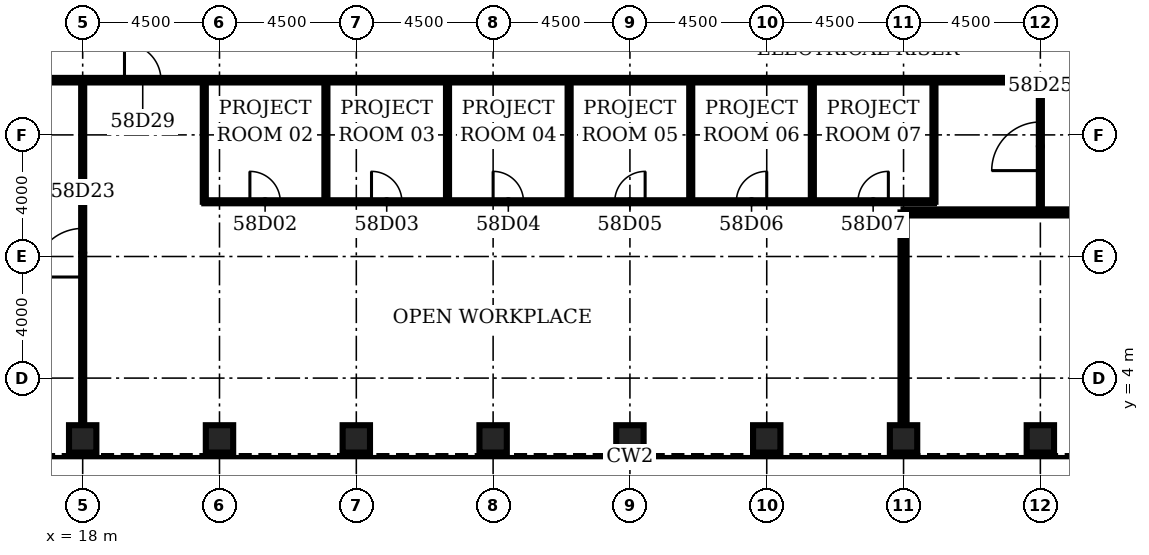
"""IFC4 building model, lengths in metres.
Left out: names, types, materials, properties, quantities, classifications, styles, units other than length and angle.
Written with IfcOpenShell. Run it as: python <this file> out.ifc"""

import sys

from ifc_helpers import new_model, si_unit, direction, frame, frame_2d, origin, origin_2d, place, context, subcontext, project, spatial, rectangle, hollow_rectangle, extrude, element, fill, save


model = new_model("IFC4")
c1 = context("Model", 3, precision=1e-05, world=origin(), true_north=direction((0.0, 1.0)))
c2 = subcontext(c1, "Body", "Model", "MODEL_VIEW")
j1 = project(units=[si_unit("LENGTHUNIT", "METRE"), si_unit("PLANEANGLEUNIT", "RADIAN")], contexts=[c1])
p1 = place(None, origin())
s1 = spatial("IfcSite", under=j1, at=p1, CompositionType="ELEMENT")
p2 = place(p1, origin())
s2 = spatial("IfcBuilding", under=s1, at=p2, CompositionType="ELEMENT")
p3 = place(p2, frame((0.0, 0.0, 257.2)))
s3 = spatial("IfcBuildingStorey", under=s2, at=p3, CompositionType="ELEMENT", Elevation=257.2)
for number, where, z_axis, x_axis in (
    (1, (18.0, 2.0, 0.0), (0.0, 0.0, 1.0), (0.0, 1.0, 0.0)),
    (2, (22.5, 2.0, 0.0), (0.0, 0.0, 1.0), (0.0, 1.0, 0.0)),
    (3, (27.0, 2.0, 0.0), (0.0, 0.0, 1.0), (0.0, 1.0, 0.0)),
    (4, (31.5, 2.0, 0.0), (0.0, 0.0, 1.0), (0.0, 1.0, 0.0)),
    (5, (36.0, 2.0, 0.0), (0.0, 0.0, 1.0), (0.0, 1.0, 0.0)),
    (6, (40.5, 2.0, 0.0), (0.0, 0.0, 1.0), (0.0, 1.0, 0.0)),
    (7, (45.0, 2.0, 0.0), (0.0, 0.0, 1.0), (0.0, 1.0, 0.0)),
    (8, (49.5, 2.0, 0.0), (0.0, 0.0, 1.0), (0.0, 1.0, 0.0)),
):
    element("IfcColumn", number, at=place(p3, frame(where, z_axis=z_axis, x_axis=x_axis)), inside=s3, PredefinedType="COLUMN", context=c2, shape_type="SweptSolid", body=[
        extrude(hollow_rectangle(XDim=0.9, YDim=0.9, WallThickness=0.07, at=origin_2d()), origin(), (0.0, 0.0, 1.0), 4.2),
    ])
p4 = place(p3, frame((45.0, 9.45, 0.0), z_axis=(0.0, 0.0, 1.0), x_axis=(1.0, 0.0, 0.0)))
e9 = element("IfcWall", 9, at=p4, inside=s3, PredefinedType="PARTITIONING", context=c2, shape_type="SweptSolid", body=[
    extrude(rectangle(XDim=18.0, YDim=0.2, at=frame_2d((9.0, 0.0))), origin(), (0.0, 0.0, 1.0), 3.0),
])
p5 = place(p4, frame((8.2, 0.0, 0.0)))
e10 = element("IfcOpeningElement", 10, at=p5, cuts=e9, PredefinedType="OPENING", context=c2, shape_type="SweptSolid", body=[
    extrude(rectangle(XDim=1.6, YDim=2.1, at=frame_2d((0.8, 1.05))), frame((0.0, 0.11, 0.0), z_axis=(0.0, -1.0, 0.0), x_axis=(1.0, 0.0, 0.0)), (0.0, 0.0, 1.0), 0.22),
])
p6 = place(p3, frame((22.0, 9.8, 0.0), z_axis=(0.0, 0.0, 1.0), x_axis=(1.0, 0.0, 0.0)))
e11 = element("IfcWall", 11, at=p6, inside=s3, PredefinedType="PARTITIONING", context=c2, shape_type="SweptSolid", body=[
    extrude(rectangle(XDim=24.0, YDim=0.1, at=frame_2d((12.0, 0.0))), origin(), (0.0, 0.0, 1.0), 3.0),
])
p7 = place(p6, frame((1.5, 0.0, 0.0)))
e12 = element("IfcOpeningElement", 12, at=p7, cuts=e11, PredefinedType="OPENING", context=c2, shape_type="SweptSolid", body=[
    extrude(rectangle(XDim=1.0, YDim=2.1, at=frame_2d((0.5, 1.05))), frame((0.0, 0.06, 0.0), z_axis=(0.0, -1.0, 0.0), x_axis=(1.0, 0.0, 0.0)), (0.0, 0.0, 1.0), 0.12),
])
p8 = place(p6, frame((5.5, 0.0, 0.0)))
e13 = element("IfcOpeningElement", 13, at=p8, cuts=e11, PredefinedType="OPENING", context=c2, shape_type="SweptSolid", body=[
    extrude(rectangle(XDim=1.0, YDim=2.1, at=frame_2d((0.5, 1.05))), frame((0.0, 0.06, 0.0), z_axis=(0.0, -1.0, 0.0), x_axis=(1.0, 0.0, 0.0)), (0.0, 0.0, 1.0), 0.12),
])
p9 = place(p6, frame((9.5, 0.0, 0.0)))
e14 = element("IfcOpeningElement", 14, at=p9, cuts=e11, PredefinedType="OPENING", context=c2, shape_type="SweptSolid", body=[
    extrude(rectangle(XDim=1.0, YDim=2.1, at=frame_2d((0.5, 1.05))), frame((0.0, 0.06, 0.0), z_axis=(0.0, -1.0, 0.0), x_axis=(1.0, 0.0, 0.0)), (0.0, 0.0, 1.0), 0.12),
])
p10 = place(p6, frame((13.5, 0.0, 0.0)))
e15 = element("IfcOpeningElement", 15, at=p10, cuts=e11, PredefinedType="OPENING", context=c2, shape_type="SweptSolid", body=[
    extrude(rectangle(XDim=1.0, YDim=2.1, at=frame_2d((0.5, 1.05))), frame((0.0, 0.06, 0.0), z_axis=(0.0, -1.0, 0.0), x_axis=(1.0, 0.0, 0.0)), (0.0, 0.0, 1.0), 0.12),
])
p11 = place(p6, frame((17.5, 0.0, 0.0)))
e16 = element("IfcOpeningElement", 16, at=p11, cuts=e11, PredefinedType="OPENING", context=c2, shape_type="SweptSolid", body=[
    extrude(rectangle(XDim=1.0, YDim=2.1, at=frame_2d((0.5, 1.05))), frame((0.0, 0.06, 0.0), z_axis=(0.0, -1.0, 0.0), x_axis=(1.0, 0.0, 0.0)), (0.0, 0.0, 1.0), 0.12),
])
p12 = place(p6, frame((21.5, 0.0, 0.0)))
e17 = element("IfcOpeningElement", 17, at=p12, cuts=e11, PredefinedType="OPENING", context=c2, shape_type="SweptSolid", body=[
    extrude(rectangle(XDim=1.0, YDim=2.1, at=frame_2d((0.5, 1.05))), frame((0.0, 0.06, 0.0), z_axis=(0.0, -1.0, 0.0), x_axis=(1.0, 0.0, 0.0)), (0.0, 0.0, 1.0), 0.12),
])
p13 = place(p3, frame((15.2, 13.8, 0.0), z_axis=(0.0, 0.0, 1.0), x_axis=(1.0, 0.0, 0.0)))
e18 = element("IfcWall", 18, at=p13, inside=s3, PredefinedType="PARTITIONING", context=c2, shape_type="SweptSolid", body=[
    extrude(rectangle(XDim=41.6, YDim=0.15, at=frame_2d((20.8, 0.0))), origin(), (0.0, 0.0, 1.0), 3.0),
])
p14 = place(p13, frame((4.175, 0.0, 0.0)))
e19 = element("IfcOpeningElement", 19, at=p14, cuts=e18, PredefinedType="OPENING", context=c2, shape_type="SweptSolid", body=[
    extrude(rectangle(XDim=1.2, YDim=2.1, at=frame_2d((0.6, 1.05))), frame((0.0, 0.085, 0.0), z_axis=(0.0, -1.0, 0.0), x_axis=(1.0, 0.0, 0.0)), (0.0, 0.0, 1.0), 0.17),
])
p15 = place(p3, frame((18.0, 2.45, 0.0), z_axis=(0.0, 0.0, 1.0), x_axis=(0.0, 1.0, 0.0)))
e20 = element("IfcWall", 20, at=p15, inside=s3, PredefinedType="PARTITIONING", context=c2, shape_type="SweptSolid", body=[
    extrude(rectangle(XDim=11.35, YDim=0.1, at=frame_2d((5.675, 0.0))), origin(), (0.0, 0.0, 1.0), 3.0),
])
p16 = place(p15, frame((4.875, 0.0, 0.0)))
e21 = element("IfcOpeningElement", 21, at=p16, cuts=e20, PredefinedType="OPENING", context=c2, shape_type="SweptSolid", body=[
    extrude(rectangle(XDim=1.6, YDim=2.1, at=frame_2d((0.8, 1.05))), frame((0.0, 0.06, 0.0), z_axis=(0.0, -1.0, 0.0), x_axis=(1.0, 0.0, 0.0)), (0.0, 0.0, 1.0), 0.12),
])
for number, where, z_axis, x_axis in (
    (22, (22.0, 9.8, 0.0), (0.0, 0.0, 1.0), (0.0, 1.0, 0.0)),
    (23, (26.0, 9.8, 0.0), (0.0, 0.0, 1.0), (0.0, 1.0, 0.0)),
    (24, (30.0, 9.8, 0.0), (0.0, 0.0, 1.0), (0.0, 1.0, 0.0)),
    (25, (34.0, 9.8, 0.0), (0.0, 0.0, 1.0), (0.0, 1.0, 0.0)),
    (26, (38.0, 9.8, 0.0), (0.0, 0.0, 1.0), (0.0, 1.0, 0.0)),
    (27, (42.0, 9.8, 0.0), (0.0, 0.0, 1.0), (0.0, 1.0, 0.0)),
):
    element("IfcWall", number, at=place(p3, frame(where, z_axis=z_axis, x_axis=x_axis)), inside=s3, PredefinedType="PARTITIONING", context=c2, shape_type="SweptSolid", body=[
        extrude(rectangle(XDim=4.0, YDim=0.1, at=frame_2d((2.0, 0.0))), origin(), (0.0, 0.0, 1.0), 3.0),
    ])
p17 = place(p3, frame((45.0, 2.45, 0.0), z_axis=(0.0, 0.0, 1.0), x_axis=(0.0, 1.0, 0.0)))
e28 = element("IfcWall", 28, at=p17, inside=s3, PredefinedType="PARTITIONING", context=c2, shape_type="SweptSolid", body=[
    extrude(rectangle(XDim=7.0, YDim=0.2, at=frame_2d((3.5, 0.0))), origin(), (0.0, 0.0, 1.0), 3.0),
])
p18 = place(p3, frame((46.0, 9.8, 0.0), z_axis=(0.0, 0.0, 1.0), x_axis=(0.0, 1.0, 0.0)))
e29 = element("IfcWall", 29, at=p18, inside=s3, PredefinedType="PARTITIONING", context=c2, shape_type="SweptSolid", body=[
    extrude(rectangle(XDim=4.0, YDim=0.1, at=frame_2d((2.0, 0.0))), origin(), (0.0, 0.0, 1.0), 3.0),
])
p19 = place(p3, frame((49.5, 9.45, 0.0), z_axis=(0.0, 0.0, 1.0), x_axis=(0.0, 1.0, 0.0)))
e30 = element("IfcWall", 30, at=p19, inside=s3, PredefinedType="PARTITIONING", context=c2, shape_type="SweptSolid", body=[
    extrude(rectangle(XDim=4.35, YDim=0.1, at=frame_2d((2.175, 0.0))), origin(), (0.0, 0.0, 1.0), 3.0),
])
p20 = place(p19, frame((1.375, 0.0, 0.0)))
e31 = element("IfcOpeningElement", 31, at=p20, cuts=e30, PredefinedType="OPENING", context=c2, shape_type="SweptSolid", body=[
    extrude(rectangle(XDim=1.6, YDim=2.1, at=frame_2d((0.8, 1.05))), frame((0.0, 0.06, 0.0), z_axis=(0.0, -1.0, 0.0), x_axis=(1.0, 0.0, 0.0)), (0.0, 0.0, 1.0), 0.12),
])
p21 = place(p7, origin())
e32 = element("IfcDoor", 32, at=p21, inside=s3, OperationType="SINGLE_SWING_LEFT", PredefinedType="DOOR", context=c2, shape_type="SweptSolid", body=[
    extrude(rectangle(XDim=1.0, YDim=2.1, at=frame_2d((0.5, 1.05))), frame((0.0, 0.025, 0.0), z_axis=(0.0, -1.0, 0.0), x_axis=(1.0, 0.0, 0.0)), (0.0, 0.0, 1.0), 0.05),
])
fill(e12, e32)
p22 = place(p8, origin())
e33 = element("IfcDoor", 33, at=p22, inside=s3, OperationType="SINGLE_SWING_LEFT", PredefinedType="DOOR", context=c2, shape_type="SweptSolid", body=[
    extrude(rectangle(XDim=1.0, YDim=2.1, at=frame_2d((0.5, 1.05))), frame((0.0, 0.025, 0.0), z_axis=(0.0, -1.0, 0.0), x_axis=(1.0, 0.0, 0.0)), (0.0, 0.0, 1.0), 0.05),
])
fill(e13, e33)
p23 = place(p9, origin())
e34 = element("IfcDoor", 34, at=p23, inside=s3, OperationType="SINGLE_SWING_LEFT", PredefinedType="DOOR", context=c2, shape_type="SweptSolid", body=[
    extrude(rectangle(XDim=1.0, YDim=2.1, at=frame_2d((0.5, 1.05))), frame((0.0, 0.025, 0.0), z_axis=(0.0, -1.0, 0.0), x_axis=(1.0, 0.0, 0.0)), (0.0, 0.0, 1.0), 0.05),
])
fill(e14, e34)
p24 = place(p10, origin())
e35 = element("IfcDoor", 35, at=p24, inside=s3, OperationType="SINGLE_SWING_RIGHT", PredefinedType="DOOR", context=c2, shape_type="SweptSolid", body=[
    extrude(rectangle(XDim=1.0, YDim=2.1, at=frame_2d((0.5, 1.05))), frame((0.0, 0.025, 0.0), z_axis=(0.0, -1.0, 0.0), x_axis=(1.0, 0.0, 0.0)), (0.0, 0.0, 1.0), 0.05),
])
fill(e15, e35)
p25 = place(p11, origin())
e36 = element("IfcDoor", 36, at=p25, inside=s3, OperationType="SINGLE_SWING_RIGHT", PredefinedType="DOOR", context=c2, shape_type="SweptSolid", body=[
    extrude(rectangle(XDim=1.0, YDim=2.1, at=frame_2d((0.5, 1.05))), frame((0.0, 0.025, 0.0), z_axis=(0.0, -1.0, 0.0), x_axis=(1.0, 0.0, 0.0)), (0.0, 0.0, 1.0), 0.05),
])
fill(e16, e36)
p26 = place(p12, origin())
e37 = element("IfcDoor", 37, at=p26, inside=s3, OperationType="SINGLE_SWING_RIGHT", PredefinedType="DOOR", context=c2, shape_type="SweptSolid", body=[
    extrude(rectangle(XDim=1.0, YDim=2.1, at=frame_2d((0.5, 1.05))), frame((0.0, 0.025, 0.0), z_axis=(0.0, -1.0, 0.0), x_axis=(1.0, 0.0, 0.0)), (0.0, 0.0, 1.0), 0.05),
])
fill(e17, e37)
p27 = place(p16, origin())
e38 = element("IfcDoor", 38, at=p27, inside=s3, OperationType="SINGLE_SWING_LEFT", PredefinedType="DOOR", context=c2, shape_type="SweptSolid", body=[
    extrude(rectangle(XDim=1.6, YDim=2.1, at=frame_2d((0.8, 1.05))), frame((0.0, 0.025, 0.0), z_axis=(0.0, -1.0, 0.0), x_axis=(1.0, 0.0, 0.0)), (0.0, 0.0, 1.0), 0.05),
])
fill(e21, e38)
p28 = place(p20, origin())
e39 = element("IfcDoor", 39, at=p28, inside=s3, OperationType="SINGLE_SWING_LEFT", PredefinedType="DOOR", context=c2, shape_type="SweptSolid", body=[
    extrude(rectangle(XDim=1.6, YDim=2.1, at=frame_2d((0.8, 1.05))), frame((0.0, 0.025, 0.0), z_axis=(0.0, -1.0, 0.0), x_axis=(1.0, 0.0, 0.0)), (0.0, 0.0, 1.0), 0.05),
])
fill(e31, e39)
p29 = place(p14, origin())
e40 = element("IfcDoor", 40, at=p29, inside=s3, OperationType="SINGLE_SWING_LEFT", PredefinedType="DOOR", context=c2, shape_type="SweptSolid", body=[
    extrude(rectangle(XDim=1.2, YDim=2.1, at=frame_2d((0.6, 1.05))), frame((0.0, 0.025, 0.0), z_axis=(0.0, -1.0, 0.0), x_axis=(1.0, 0.0, 0.0)), (0.0, 0.0, 1.0), 0.05),
])
fill(e19, e40)
save(model, sys.argv[1])
